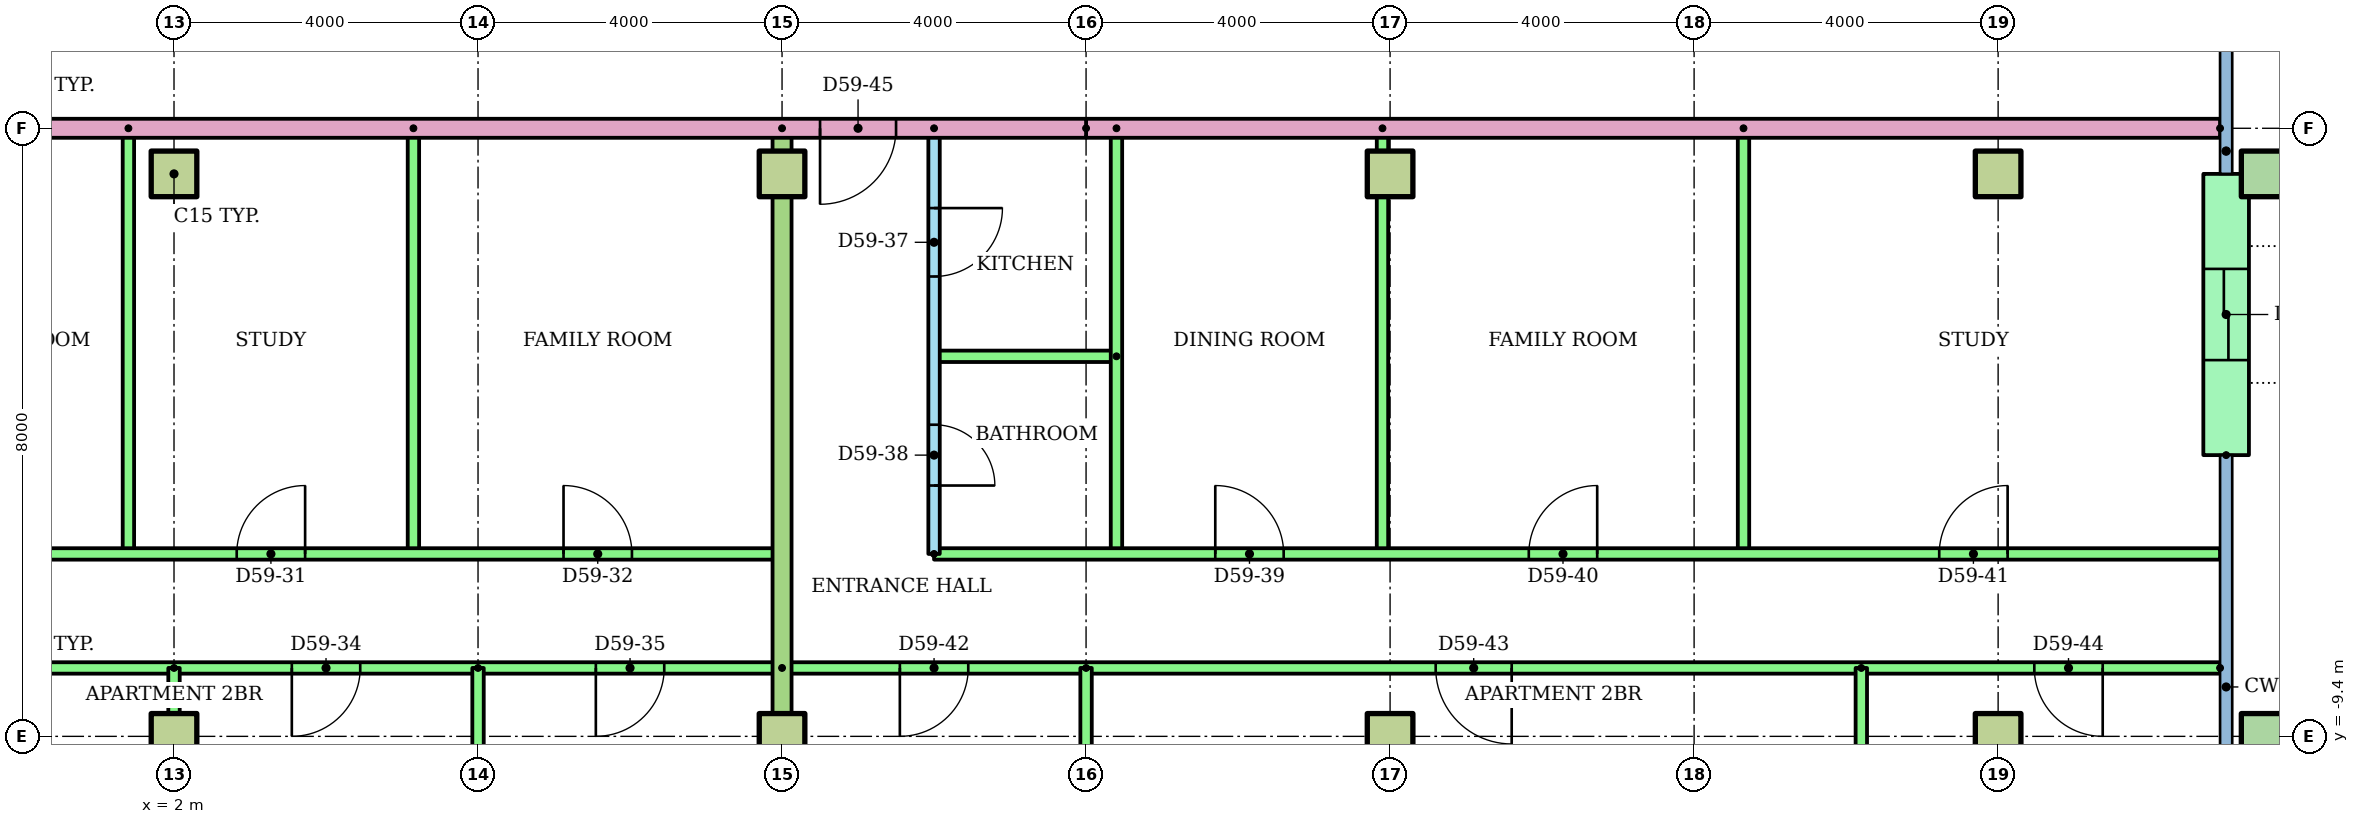
"""IFC4 building model, lengths in metres.
Left out: names, types, materials, properties, quantities, classifications, styles, units other than length and angle.
Written with IfcOpenShell. Run it as: python <this file> out.ifc"""

import sys

from ifc_helpers import new_model, si_unit, direction, frame, frame_2d, origin, origin_2d, place, context, subcontext, project, spatial, rectangle, hollow_rectangle, extrude, element, fill, save


model = new_model("IFC4")
c1 = context("Model", 3, precision=1e-05, world=origin(), true_north=direction((0.0, 1.0)))
c2 = subcontext(c1, "Body", "Model", "MODEL_VIEW")
j1 = project(units=[si_unit("LENGTHUNIT", "METRE"), si_unit("PLANEANGLEUNIT", "RADIAN")], contexts=[c1])
p1 = place(None, origin())
s1 = spatial("IfcSite", under=j1, at=p1, CompositionType="ELEMENT")
p2 = place(p1, origin())
s2 = spatial("IfcBuilding", under=s1, at=p2, CompositionType="ELEMENT")
p3 = place(p2, frame((0.0, 0.0, 226.8)))
s3 = spatial("IfcBuildingStorey", under=s2, at=p3, CompositionType="ELEMENT", Elevation=226.8)
for number, where in (
    (1, (2.0, -9.4, 0.0)),
    (2, (10.0, -9.4, 0.0)),
    (3, (18.0, -9.4, 0.0)),
    (4, (26.0, -9.4, 0.0)),
):
    element("IfcColumn", number, at=place(p3, frame(where)), inside=s3, PredefinedType="COLUMN", context=c2, shape_type="SweptSolid", body=[
        extrude(rectangle(XDim=0.6, YDim=0.6, at=origin_2d()), origin(), (0.0, 0.0, 1.0), 3.2),
    ])
p4 = place(p3, frame((29.5, -9.4, 0.0)))
e5 = element("IfcColumn", 5, at=p4, inside=s3, PredefinedType="COLUMN", context=c2, shape_type="SweptSolid", body=[
    extrude(hollow_rectangle(XDim=0.6, YDim=0.6, WallThickness=0.03, at=origin_2d()), origin(), (0.0, 0.0, 1.0), 3.2),
])
for number, where in (
    (6, (2.0, -2.0, 0.0)),
    (7, (10.0, -2.0, 0.0)),
    (8, (18.0, -2.0, 0.0)),
    (9, (26.0, -2.0, 0.0)),
):
    element("IfcColumn", number, at=place(p3, frame(where)), inside=s3, PredefinedType="COLUMN", context=c2, shape_type="SweptSolid", body=[
        extrude(rectangle(XDim=0.6, YDim=0.6, at=origin_2d()), origin(), (0.0, 0.0, 1.0), 3.2),
    ])
p5 = place(p3, frame((29.5, -2.0, 0.0)))
e10 = element("IfcColumn", 10, at=p5, inside=s3, PredefinedType="COLUMN", context=c2, shape_type="SweptSolid", body=[
    extrude(hollow_rectangle(XDim=0.6, YDim=0.6, WallThickness=0.03, at=origin_2d()), origin(), (0.0, 0.0, 1.0), 3.2),
])
p6 = place(p3, frame((29.0, -5.7, 0.0), z_axis=(0.0, 0.0, 1.0), x_axis=(0.0, 1.0, 0.0)))
e11 = element("IfcWall", 11, at=p6, inside=s3, PredefinedType="STANDARD", context=c2, shape_type="SweptSolid", body=[
    extrude(rectangle(XDim=3.7, YDim=0.6, at=frame_2d((1.85, 0.0))), origin(), (0.0, 0.0, 1.0), 2.92),
])
p7 = place(p6, frame((1.25, 0.0, 0.0)))
e12 = element("IfcOpeningElement", 12, at=p7, cuts=e11, PredefinedType="OPENING", context=c2, shape_type="SweptSolid", body=[
    extrude(rectangle(XDim=1.2, YDim=2.1, at=frame_2d((0.6, 1.05))), frame((0.0, 0.31, 0.0), z_axis=(0.0, -1.0, 0.0), x_axis=(1.0, 0.0, 0.0)), (0.0, 0.0, 1.0), 0.62),
])
for number, where, z_axis, x_axis in (
    (13, (1.4, -1.4, 0.0), (0.0, 0.0, 1.0), (0.0, -1.0, 0.0)),
    (14, (5.15, -1.4, 0.0), (0.0, 0.0, 1.0), (0.0, -1.0, 0.0)),
):
    element("IfcWall", number, at=place(p3, frame(where, z_axis=z_axis, x_axis=x_axis)), inside=s3, PredefinedType="PARTITIONING", context=c2, shape_type="SweptSolid", body=[
        extrude(rectangle(XDim=5.6, YDim=0.15, at=frame_2d((2.8, 0.0))), origin(), (0.0, 0.0, 1.0), 2.4),
    ])
p8 = place(p3, frame((-4.0, -7.0, 0.0)))
e15 = element("IfcWall", 15, at=p8, inside=s3, PredefinedType="PARTITIONING", context=c2, shape_type="SweptSolid", body=[
    extrude(rectangle(XDim=14.0, YDim=0.15, at=frame_2d((7.0, 0.0))), origin(), (0.0, 0.0, 1.0), 2.4),
])
p9 = place(p8, frame((3.45, 0.0, 0.0)))
e16 = element("IfcOpeningElement", 16, at=p9, cuts=e15, PredefinedType="OPENING", context=c2, shape_type="SweptSolid", body=[
    extrude(rectangle(XDim=0.9, YDim=2.1, at=frame_2d((0.45, 1.05))), frame((0.0, 0.085, 0.0), z_axis=(0.0, -1.0, 0.0), x_axis=(1.0, 0.0, 0.0)), (0.0, 0.0, 1.0), 0.17),
])
p10 = place(p8, frame((6.825, 0.0, 0.0)))
e17 = element("IfcOpeningElement", 17, at=p10, cuts=e15, PredefinedType="OPENING", context=c2, shape_type="SweptSolid", body=[
    extrude(rectangle(XDim=0.9, YDim=2.1, at=frame_2d((0.45, 1.05))), frame((0.0, 0.085, 0.0), z_axis=(0.0, -1.0, 0.0), x_axis=(1.0, 0.0, 0.0)), (0.0, 0.0, 1.0), 0.17),
])
p11 = place(p8, frame((11.125, 0.0, 0.0)))
e18 = element("IfcOpeningElement", 18, at=p11, cuts=e15, PredefinedType="OPENING", context=c2, shape_type="SweptSolid", body=[
    extrude(rectangle(XDim=0.9, YDim=2.1, at=frame_2d((0.45, 1.05))), frame((0.0, 0.085, 0.0), z_axis=(0.0, -1.0, 0.0), x_axis=(1.0, 0.0, 0.0)), (0.0, 0.0, 1.0), 0.17),
])
p12 = place(p3, frame((10.0, -8.5, 0.0), z_axis=(0.0, 0.0, 1.0), x_axis=(-1.0, 0.0, 0.0)))
e19 = element("IfcWall", 19, at=p12, inside=s3, PredefinedType="PARTITIONING", context=c2, shape_type="SweptSolid", body=[
    extrude(rectangle(XDim=16.0, YDim=0.15, at=frame_2d((8.0, 0.0))), origin(), (0.0, 0.0, 1.0), 2.4),
])
p13 = place(p12, frame((11.5, 0.0, 0.0)))
e20 = element("IfcOpeningElement", 20, at=p13, cuts=e19, PredefinedType="OPENING", context=c2, shape_type="SweptSolid", body=[
    extrude(rectangle(XDim=1.0, YDim=2.1, at=frame_2d((0.5, 1.05))), frame((0.0, 0.085, 0.0), z_axis=(0.0, -1.0, 0.0), x_axis=(1.0, 0.0, 0.0)), (0.0, 0.0, 1.0), 0.17),
])
p14 = place(p12, frame((5.55, 0.0, 0.0)))
e21 = element("IfcOpeningElement", 21, at=p14, cuts=e19, PredefinedType="OPENING", context=c2, shape_type="SweptSolid", body=[
    extrude(rectangle(XDim=0.9, YDim=2.1, at=frame_2d((0.45, 1.05))), frame((0.0, 0.085, 0.0), z_axis=(0.0, -1.0, 0.0), x_axis=(1.0, 0.0, 0.0)), (0.0, 0.0, 1.0), 0.17),
])
p15 = place(p12, frame((1.55, 0.0, 0.0)))
e22 = element("IfcOpeningElement", 22, at=p15, cuts=e19, PredefinedType="OPENING", context=c2, shape_type="SweptSolid", body=[
    extrude(rectangle(XDim=0.9, YDim=2.1, at=frame_2d((0.45, 1.05))), frame((0.0, 0.085, 0.0), z_axis=(0.0, -1.0, 0.0), x_axis=(1.0, 0.0, 0.0)), (0.0, 0.0, 1.0), 0.17),
])
p16 = place(p3, frame((2.0, -8.5, 0.0), z_axis=(0.0, 0.0, 1.0), x_axis=(0.0, -1.0, 0.0)))
e23 = element("IfcWall", 23, at=p16, inside=s3, PredefinedType="PARTITIONING", context=c2, shape_type="SweptSolid", body=[
    extrude(rectangle(XDim=8.01, YDim=0.15, at=frame_2d((4.005, 0.0))), origin(), (0.0, 0.0, 1.0), 2.4),
])
p17 = place(p3, frame((6.0, -8.5, 0.0), z_axis=(0.0, 0.0, 1.0), x_axis=(0.0, -1.0, 0.0)))
e24 = element("IfcWall", 24, at=p17, inside=s3, PredefinedType="PARTITIONING", context=c2, shape_type="SweptSolid", body=[
    extrude(rectangle(XDim=8.021, YDim=0.15, at=frame_2d((4.01, 0.0))), origin(), (0.0, 0.0, 1.0), 2.4),
])
p18 = place(p3, frame((12.0, -1.4, 0.0), z_axis=(0.0, 0.0, 1.0), x_axis=(0.0, -1.0, 0.0)))
e25 = element("IfcWall", 25, at=p18, inside=s3, PredefinedType="PARTITIONING", context=c2, shape_type="SweptSolid", body=[
    extrude(rectangle(XDim=5.6, YDim=0.15, at=frame_2d((2.8, 0.0))), origin(), (0.0, 0.0, 1.0), 2.4),
])
p19 = place(p18, frame((1.05, 0.0, 0.0)))
e26 = element("IfcOpeningElement", 26, at=p19, cuts=e25, PredefinedType="OPENING", context=c2, shape_type="SweptSolid", body=[
    extrude(rectangle(XDim=0.9, YDim=2.1, at=frame_2d((0.45, 1.05))), frame((0.0, 0.085, 0.0), z_axis=(0.0, -1.0, 0.0), x_axis=(1.0, 0.0, 0.0)), (0.0, 0.0, 1.0), 0.17),
])
p20 = place(p18, frame((3.9, 0.0, 0.0)))
e27 = element("IfcOpeningElement", 27, at=p20, cuts=e25, PredefinedType="OPENING", context=c2, shape_type="SweptSolid", body=[
    extrude(rectangle(XDim=0.8, YDim=2.1, at=frame_2d((0.4, 1.05))), frame((0.0, 0.085, 0.0), z_axis=(0.0, -1.0, 0.0), x_axis=(1.0, 0.0, 0.0)), (0.0, 0.0, 1.0), 0.17),
])
p21 = place(p3, frame((14.4, -4.4, 0.0), z_axis=(0.0, 0.0, 1.0), x_axis=(-1.0, 0.0, 0.0)))
e28 = element("IfcWall", 28, at=p21, inside=s3, PredefinedType="PARTITIONING", context=c2, shape_type="SweptSolid", body=[
    extrude(rectangle(XDim=2.4, YDim=0.15, at=frame_2d((1.2, 0.0))), origin(), (0.0, 0.0, 1.0), 2.4),
])
for number, where, z_axis, x_axis in (
    (29, (14.4, -1.4, 0.0), (0.0, 0.0, 1.0), (0.0, -1.0, 0.0)),
    (30, (17.9, -1.4, 0.0), (0.0, 0.0, 1.0), (0.0, -1.0, 0.0)),
    (31, (22.65, -1.4, 0.0), (0.0, 0.0, 1.0), (0.0, -1.0, 0.0)),
):
    element("IfcWall", number, at=place(p3, frame(where, z_axis=z_axis, x_axis=x_axis)), inside=s3, PredefinedType="PARTITIONING", context=c2, shape_type="SweptSolid", body=[
        extrude(rectangle(XDim=5.6, YDim=0.15, at=frame_2d((2.8, 0.0))), origin(), (0.0, 0.0, 1.0), 2.4),
    ])
p22 = place(p3, frame((12.0, -7.0, 0.0)))
e32 = element("IfcWall", 32, at=p22, inside=s3, PredefinedType="PARTITIONING", context=c2, shape_type="SweptSolid", body=[
    extrude(rectangle(XDim=16.92, YDim=0.15, at=frame_2d((8.46, 0.0))), origin(), (0.0, 0.0, 1.0), 2.4),
])
p23 = place(p22, frame((3.7, 0.0, 0.0)))
e33 = element("IfcOpeningElement", 33, at=p23, cuts=e32, PredefinedType="OPENING", context=c2, shape_type="SweptSolid", body=[
    extrude(rectangle(XDim=0.9, YDim=2.1, at=frame_2d((0.45, 1.05))), frame((0.0, 0.085, 0.0), z_axis=(0.0, -1.0, 0.0), x_axis=(1.0, 0.0, 0.0)), (0.0, 0.0, 1.0), 0.17),
])
p24 = place(p22, frame((7.825, 0.0, 0.0)))
e34 = element("IfcOpeningElement", 34, at=p24, cuts=e32, PredefinedType="OPENING", context=c2, shape_type="SweptSolid", body=[
    extrude(rectangle(XDim=0.9, YDim=2.1, at=frame_2d((0.45, 1.05))), frame((0.0, 0.085, 0.0), z_axis=(0.0, -1.0, 0.0), x_axis=(1.0, 0.0, 0.0)), (0.0, 0.0, 1.0), 0.17),
])
p25 = place(p22, frame((13.225, 0.0, 0.0)))
e35 = element("IfcOpeningElement", 35, at=p25, cuts=e32, PredefinedType="OPENING", context=c2, shape_type="SweptSolid", body=[
    extrude(rectangle(XDim=0.9, YDim=2.1, at=frame_2d((0.45, 1.05))), frame((0.0, 0.085, 0.0), z_axis=(0.0, -1.0, 0.0), x_axis=(1.0, 0.0, 0.0)), (0.0, 0.0, 1.0), 0.17),
])
p26 = place(p3, frame((28.92, -8.5, 0.0), z_axis=(0.0, 0.0, 1.0), x_axis=(-1.0, 0.0, 0.0)))
e36 = element("IfcWall", 36, at=p26, inside=s3, PredefinedType="PARTITIONING", context=c2, shape_type="SweptSolid", body=[
    extrude(rectangle(XDim=18.92, YDim=0.15, at=frame_2d((9.46, 0.0))), origin(), (0.0, 0.0, 1.0), 2.4),
])
p27 = place(p26, frame((16.47, 0.0, 0.0)))
e37 = element("IfcOpeningElement", 37, at=p27, cuts=e36, PredefinedType="OPENING", context=c2, shape_type="SweptSolid", body=[
    extrude(rectangle(XDim=0.9, YDim=2.1, at=frame_2d((0.45, 1.05))), frame((0.0, 0.085, 0.0), z_axis=(0.0, -1.0, 0.0), x_axis=(1.0, 0.0, 0.0)), (0.0, 0.0, 1.0), 0.17),
])
p28 = place(p26, frame((9.32, 0.0, 0.0)))
e38 = element("IfcOpeningElement", 38, at=p28, cuts=e36, PredefinedType="OPENING", context=c2, shape_type="SweptSolid", body=[
    extrude(rectangle(XDim=1.0, YDim=2.1, at=frame_2d((0.5, 1.05))), frame((0.0, 0.085, 0.0), z_axis=(0.0, -1.0, 0.0), x_axis=(1.0, 0.0, 0.0)), (0.0, 0.0, 1.0), 0.17),
])
p29 = place(p26, frame((1.544, 0.0, 0.0)))
e39 = element("IfcOpeningElement", 39, at=p29, cuts=e36, PredefinedType="OPENING", context=c2, shape_type="SweptSolid", body=[
    extrude(rectangle(XDim=0.9, YDim=2.1, at=frame_2d((0.45, 1.05))), frame((0.0, 0.085, 0.0), z_axis=(0.0, -1.0, 0.0), x_axis=(1.0, 0.0, 0.0)), (0.0, 0.0, 1.0), 0.17),
])
p30 = place(p3, frame((14.0, -8.5, 0.0), z_axis=(0.0, 0.0, 1.0), x_axis=(0.0, -1.0, 0.0)))
e40 = element("IfcWall", 40, at=p30, inside=s3, PredefinedType="PARTITIONING", context=c2, shape_type="SweptSolid", body=[
    extrude(rectangle(XDim=8.021, YDim=0.15, at=frame_2d((4.01, 0.0))), origin(), (0.0, 0.0, 1.0), 2.4),
])
p31 = place(p3, frame((24.2, -8.5, 0.0), z_axis=(0.0, 0.0, 1.0), x_axis=(0.0, -1.0, 0.0)))
e41 = element("IfcWall", 41, at=p31, inside=s3, PredefinedType="PARTITIONING", context=c2, shape_type="SweptSolid", body=[
    extrude(rectangle(XDim=6.22, YDim=0.15, at=frame_2d((3.11, 0.0))), origin(), (0.0, 0.0, 1.0), 2.4),
])
p32 = place(p3, frame((10.0, -1.4, 0.0), z_axis=(0.0, 0.0, 1.0), x_axis=(0.0, -1.0, 0.0)))
e42 = element("IfcWall", 42, at=p32, inside=s3, PredefinedType="PARTITIONING", context=c2, shape_type="SweptSolid", body=[
    extrude(rectangle(XDim=15.11, YDim=0.25, at=frame_2d((7.555, 0.0))), origin(), (0.0, 0.0, 1.0), 2.4),
])
p33 = place(p3, frame((28.92, -1.4, 0.0), z_axis=(0.0, 0.0, 1.0), x_axis=(-1.0, 0.0, 0.0)))
e43 = element("IfcWall", 43, at=p33, inside=s3, PredefinedType="PARTITIONING", context=c2, shape_type="SweptSolid", body=[
    extrude(rectangle(XDim=14.92, YDim=0.25, at=frame_2d((7.46, 0.0))), origin(), (0.0, 0.0, 1.0), 2.4),
])
p34 = place(p3, frame((14.0, -1.4, 0.0), z_axis=(0.0, 0.0, 1.0), x_axis=(-1.0, 0.0, 0.0)))
e44 = element("IfcWall", 44, at=p34, inside=s3, PredefinedType="PARTITIONING", context=c2, shape_type="SweptSolid", body=[
    extrude(rectangle(XDim=28.0, YDim=0.25, at=frame_2d((14.0, 0.0))), origin(), (0.0, 0.0, 1.0), 2.4),
])
p35 = place(p34, frame((20.5, 0.0, 0.0)))
e45 = element("IfcOpeningElement", 45, at=p35, cuts=e44, PredefinedType="OPENING", context=c2, shape_type="SweptSolid", body=[
    extrude(rectangle(XDim=1.0, YDim=2.1, at=frame_2d((0.5, 1.05))), frame((0.0, 0.135, 0.0), z_axis=(0.0, -1.0, 0.0), x_axis=(1.0, 0.0, 0.0)), (0.0, 0.0, 1.0), 0.27),
])
p36 = place(p34, frame((18.5, 0.0, 0.0)))
e46 = element("IfcOpeningElement", 46, at=p36, cuts=e44, PredefinedType="OPENING", context=c2, shape_type="SweptSolid", body=[
    extrude(rectangle(XDim=1.0, YDim=2.1, at=frame_2d((0.5, 1.05))), frame((0.0, 0.135, 0.0), z_axis=(0.0, -1.0, 0.0), x_axis=(1.0, 0.0, 0.0)), (0.0, 0.0, 1.0), 0.27),
])
p37 = place(p34, frame((2.5, 0.0, 0.0)))
e47 = element("IfcOpeningElement", 47, at=p37, cuts=e44, PredefinedType="OPENING", context=c2, shape_type="SweptSolid", body=[
    extrude(rectangle(XDim=1.0, YDim=2.1, at=frame_2d((0.5, 1.05))), frame((0.0, 0.135, 0.0), z_axis=(0.0, -1.0, 0.0), x_axis=(1.0, 0.0, 0.0)), (0.0, 0.0, 1.0), 0.27),
])
p38 = place(p10, origin())
e48 = element("IfcDoor", 48, at=p38, inside=s3, OperationType="SINGLE_SWING_RIGHT", PredefinedType="DOOR", context=c2, shape_type="SweptSolid", body=[
    extrude(rectangle(XDim=0.9, YDim=2.1, at=frame_2d((0.45, 1.05))), frame((0.0, 0.025, 0.0), z_axis=(0.0, -1.0, 0.0), x_axis=(1.0, 0.0, 0.0)), (0.0, 0.0, 1.0), 0.05),
])
fill(e17, e48)
p39 = place(p11, origin())
e49 = element("IfcDoor", 49, at=p39, inside=s3, OperationType="SINGLE_SWING_LEFT", PredefinedType="DOOR", context=c2, shape_type="SweptSolid", body=[
    extrude(rectangle(XDim=0.9, YDim=2.1, at=frame_2d((0.45, 1.05))), frame((0.0, 0.025, 0.0), z_axis=(0.0, -1.0, 0.0), x_axis=(1.0, 0.0, 0.0)), (0.0, 0.0, 1.0), 0.05),
])
fill(e18, e49)
p40 = place(p14, origin())
e50 = element("IfcDoor", 50, at=p40, inside=s3, OperationType="SINGLE_SWING_RIGHT", PredefinedType="DOOR", context=c2, shape_type="SweptSolid", body=[
    extrude(rectangle(XDim=0.9, YDim=2.1, at=frame_2d((0.45, 1.05))), frame((0.0, 0.025, 0.0), z_axis=(0.0, -1.0, 0.0), x_axis=(1.0, 0.0, 0.0)), (0.0, 0.0, 1.0), 0.05),
])
fill(e21, e50)
p41 = place(p15, origin())
e51 = element("IfcDoor", 51, at=p41, inside=s3, OperationType="SINGLE_SWING_RIGHT", PredefinedType="DOOR", context=c2, shape_type="SweptSolid", body=[
    extrude(rectangle(XDim=0.9, YDim=2.1, at=frame_2d((0.45, 1.05))), frame((0.0, 0.025, 0.0), z_axis=(0.0, -1.0, 0.0), x_axis=(1.0, 0.0, 0.0)), (0.0, 0.0, 1.0), 0.05),
])
fill(e22, e51)
p42 = place(p19, origin())
e52 = element("IfcDoor", 52, at=p42, inside=s3, OperationType="SINGLE_SWING_LEFT", PredefinedType="DOOR", context=c2, shape_type="SweptSolid", body=[
    extrude(rectangle(XDim=0.9, YDim=2.1, at=frame_2d((0.45, 1.05))), frame((0.0, 0.025, 0.0), z_axis=(0.0, -1.0, 0.0), x_axis=(1.0, 0.0, 0.0)), (0.0, 0.0, 1.0), 0.05),
])
fill(e26, e52)
p43 = place(p20, origin())
e53 = element("IfcDoor", 53, at=p43, inside=s3, OperationType="SINGLE_SWING_RIGHT", PredefinedType="DOOR", context=c2, shape_type="SweptSolid", body=[
    extrude(rectangle(XDim=0.8, YDim=2.1, at=frame_2d((0.4, 1.05))), frame((0.0, 0.025, 0.0), z_axis=(0.0, -1.0, 0.0), x_axis=(1.0, 0.0, 0.0)), (0.0, 0.0, 1.0), 0.05),
])
fill(e27, e53)
p44 = place(p23, origin())
e54 = element("IfcDoor", 54, at=p44, inside=s3, OperationType="SINGLE_SWING_LEFT", PredefinedType="DOOR", context=c2, shape_type="SweptSolid", body=[
    extrude(rectangle(XDim=0.9, YDim=2.1, at=frame_2d((0.45, 1.05))), frame((0.0, 0.025, 0.0), z_axis=(0.0, -1.0, 0.0), x_axis=(1.0, 0.0, 0.0)), (0.0, 0.0, 1.0), 0.05),
])
fill(e33, e54)
p45 = place(p24, origin())
e55 = element("IfcDoor", 55, at=p45, inside=s3, OperationType="SINGLE_SWING_RIGHT", PredefinedType="DOOR", context=c2, shape_type="SweptSolid", body=[
    extrude(rectangle(XDim=0.9, YDim=2.1, at=frame_2d((0.45, 1.05))), frame((0.0, 0.025, 0.0), z_axis=(0.0, -1.0, 0.0), x_axis=(1.0, 0.0, 0.0)), (0.0, 0.0, 1.0), 0.05),
])
fill(e34, e55)
p46 = place(p25, origin())
e56 = element("IfcDoor", 56, at=p46, inside=s3, OperationType="SINGLE_SWING_RIGHT", PredefinedType="DOOR", context=c2, shape_type="SweptSolid", body=[
    extrude(rectangle(XDim=0.9, YDim=2.1, at=frame_2d((0.45, 1.05))), frame((0.0, 0.025, 0.0), z_axis=(0.0, -1.0, 0.0), x_axis=(1.0, 0.0, 0.0)), (0.0, 0.0, 1.0), 0.05),
])
fill(e35, e56)
p47 = place(p27, origin())
e57 = element("IfcDoor", 57, at=p47, inside=s3, OperationType="SINGLE_SWING_RIGHT", PredefinedType="DOOR", context=c2, shape_type="SweptSolid", body=[
    extrude(rectangle(XDim=0.9, YDim=2.1, at=frame_2d((0.45, 1.05))), frame((0.0, 0.025, 0.0), z_axis=(0.0, -1.0, 0.0), x_axis=(1.0, 0.0, 0.0)), (0.0, 0.0, 1.0), 0.05),
])
fill(e37, e57)
p48 = place(p28, origin())
e58 = element("IfcDoor", 58, at=p48, inside=s3, OperationType="SINGLE_SWING_LEFT", PredefinedType="DOOR", context=c2, shape_type="SweptSolid", body=[
    extrude(rectangle(XDim=1.0, YDim=2.1, at=frame_2d((0.5, 1.05))), frame((0.0, 0.025, 0.0), z_axis=(0.0, -1.0, 0.0), x_axis=(1.0, 0.0, 0.0)), (0.0, 0.0, 1.0), 0.05),
])
fill(e38, e58)
p49 = place(p29, origin())
e59 = element("IfcDoor", 59, at=p49, inside=s3, OperationType="SINGLE_SWING_LEFT", PredefinedType="DOOR", context=c2, shape_type="SweptSolid", body=[
    extrude(rectangle(XDim=0.9, YDim=2.1, at=frame_2d((0.45, 1.05))), frame((0.0, 0.025, 0.0), z_axis=(0.0, -1.0, 0.0), x_axis=(1.0, 0.0, 0.0)), (0.0, 0.0, 1.0), 0.05),
])
fill(e39, e59)
p50 = place(p37, origin())
e60 = element("IfcDoor", 60, at=p50, inside=s3, OperationType="SINGLE_SWING_RIGHT", PredefinedType="DOOR", context=c2, shape_type="SweptSolid", body=[
    extrude(rectangle(XDim=1.0, YDim=2.1, at=frame_2d((0.5, 1.05))), frame((0.0, 0.025, 0.0), z_axis=(0.0, -1.0, 0.0), x_axis=(1.0, 0.0, 0.0)), (0.0, 0.0, 1.0), 0.05),
])
fill(e47, e60)
p51 = place(p7, origin())
e61 = element("IfcDoor", 61, at=p51, inside=s3, OperationType="SLIDING_TO_LEFT", PredefinedType="DOOR", context=c2, shape_type="SweptSolid", body=[
    extrude(rectangle(XDim=1.2, YDim=2.1, at=frame_2d((0.6, 1.05))), frame((0.0, 0.025, 0.0), z_axis=(0.0, -1.0, 0.0), x_axis=(1.0, 0.0, 0.0)), (0.0, 0.0, 1.0), 0.05),
])
fill(e12, e61)
save(model, sys.argv[1])
